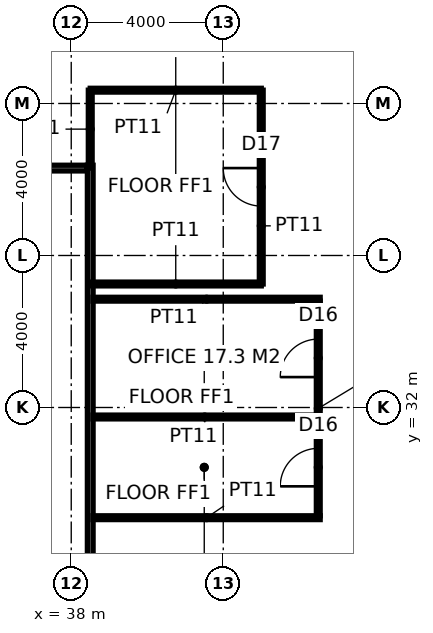
"""IFC4 building model, lengths in metres.
Left out: names, types, materials, properties, quantities, classifications, styles, units other than length and angle.
Written with IfcOpenShell. Run it as: python <this file> out.ifc"""

import sys

from ifc_helpers import new_model, si_unit, direction, frame, frame_2d, origin, place, context, subcontext, project, spatial, rectangle, extrude, element, fill, save


model = new_model("IFC4")
c1 = context("Model", 3, precision=1e-05, world=origin(), true_north=direction((0.0, 1.0)))
c2 = subcontext(c1, "Body", "Model", "MODEL_VIEW")
j1 = project(units=[si_unit("LENGTHUNIT", "METRE"), si_unit("PLANEANGLEUNIT", "RADIAN")], contexts=[c1])
p1 = place(None, origin())
s1 = spatial("IfcSite", under=j1, at=p1, CompositionType="ELEMENT")
p2 = place(p1, origin())
s2 = spatial("IfcBuilding", under=s1, at=p2, CompositionType="ELEMENT")
p3 = place(p2, frame((0.0, 0.0, 242.2)))
s3 = spatial("IfcBuildingStorey", under=s2, at=p3, CompositionType="ELEMENT", Elevation=242.2)
p4 = place(p3, frame((38.5, 15.625, 0.0), z_axis=(0.0, 0.0, 1.0), x_axis=(0.0, 1.0, 0.0)))
e1 = element("IfcWall", 1, at=p4, inside=s3, PredefinedType="PARTITIONING", context=c2, shape_type="SweptSolid", body=[
    extrude(rectangle(XDim=22.75, YDim=0.15, at=frame_2d((11.375, 0.0))), origin(), (0.0, 0.0, 1.0), 3.85),
])
p5 = place(p4, frame((10.475, 0.0, 0.0)))
e2 = element("IfcOpeningElement", 2, at=p5, cuts=e1, PredefinedType="OPENING", context=c2, shape_type="SweptSolid", body=[
    extrude(rectangle(XDim=1.8, YDim=2.4, at=frame_2d((0.9, 1.2))), frame((0.0, 0.085, 0.0), z_axis=(0.0, -1.0, 0.0), x_axis=(1.0, 0.0, 0.0)), (0.0, 0.0, 1.0), 0.17),
])
p6 = place(p3, frame((17.5, 38.3, 0.0), z_axis=(0.0, 0.0, 1.0), x_axis=(1.0, 0.0, 0.0)))
e3 = element("IfcWall", 3, at=p6, inside=s3, PredefinedType="PARTITIONING", context=c2, shape_type="SweptSolid", body=[
    extrude(rectangle(XDim=20.925, YDim=0.15, at=frame_2d((10.462, 0.0))), origin(), (0.0, 0.0, 1.0), 3.85),
])
p7 = place(p6, frame((6.25, 0.0, 0.0)))
e4 = element("IfcOpeningElement", 4, at=p7, cuts=e3, PredefinedType="OPENING", context=c2, shape_type="SweptSolid", body=[
    extrude(rectangle(XDim=0.9, YDim=2.1, at=frame_2d((0.45, 1.05))), frame((0.0, 0.085, 0.0), z_axis=(0.0, -1.0, 0.0), x_axis=(1.0, 0.0, 0.0)), (0.0, 0.0, 1.0), 0.17),
])
p8 = place(p6, frame((10.0, 0.0, 0.0)))
e5 = element("IfcOpeningElement", 5, at=p8, cuts=e3, PredefinedType="OPENING", context=c2, shape_type="SweptSolid", body=[
    extrude(rectangle(XDim=1.0, YDim=2.1, at=frame_2d((0.5, 1.05))), frame((0.0, 0.085, 0.0), z_axis=(0.0, -1.0, 0.0), x_axis=(1.0, 0.0, 0.0)), (0.0, 0.0, 1.0), 0.17),
])
p9 = place(p6, frame((13.85, 0.0, 0.0)))
e6 = element("IfcOpeningElement", 6, at=p9, cuts=e3, PredefinedType="OPENING", context=c2, shape_type="SweptSolid", body=[
    extrude(rectangle(XDim=0.9, YDim=2.1, at=frame_2d((0.45, 1.05))), frame((0.0, 0.085, 0.0), z_axis=(0.0, -1.0, 0.0), x_axis=(1.0, 0.0, 0.0)), (0.0, 0.0, 1.0), 0.17),
])
p10 = place(p3, frame((38.575, 29.1, 0.0), z_axis=(0.0, 0.0, 1.0), x_axis=(1.0, 0.0, 0.0)))
e7 = element("IfcWall", 7, at=p10, inside=s3, PredefinedType="PARTITIONING", context=c2, shape_type="SweptSolid", body=[
    extrude(rectangle(XDim=5.975, YDim=0.1, at=frame_2d((2.988, 0.0))), origin(), (0.0, 0.0, 1.0), 3.85),
])
p11 = place(p3, frame((38.575, 31.75, 0.0), z_axis=(0.0, 0.0, 1.0), x_axis=(1.0, 0.0, 0.0)))
e8 = element("IfcWall", 8, at=p11, inside=s3, PredefinedType="PARTITIONING", context=c2, shape_type="SweptSolid", body=[
    extrude(rectangle(XDim=5.875, YDim=0.1, at=frame_2d((2.938, 0.0))), origin(), (0.0, 0.0, 1.0), 3.85),
])
p12 = place(p3, frame((38.575, 34.85, 0.0), z_axis=(0.0, 0.0, 1.0), x_axis=(1.0, 0.0, 0.0)))
e9 = element("IfcWall", 9, at=p12, inside=s3, PredefinedType="PARTITIONING", context=c2, shape_type="SweptSolid", body=[
    extrude(rectangle(XDim=5.975, YDim=0.1, at=frame_2d((2.988, 0.0))), origin(), (0.0, 0.0, 1.0), 3.85),
])
p13 = place(p3, frame((44.5, 29.15, 0.0), z_axis=(0.0, 0.0, 1.0), x_axis=(0.0, 1.0, 0.0)))
e10 = element("IfcWall", 10, at=p13, inside=s3, PredefinedType="PARTITIONING", context=c2, shape_type="SweptSolid", body=[
    extrude(rectangle(XDim=5.65, YDim=0.1, at=frame_2d((2.825, 0.0))), origin(), (0.0, 0.0, 1.0), 3.85),
])
p14 = place(p13, frame((0.775, 0.0, 0.0)))
e11 = element("IfcOpeningElement", 11, at=p14, cuts=e10, PredefinedType="OPENING", context=c2, shape_type="SweptSolid", body=[
    extrude(rectangle(XDim=1.0, YDim=2.2, at=frame_2d((0.5, 1.1))), frame((0.0, 0.06, 0.0), z_axis=(0.0, -1.0, 0.0), x_axis=(1.0, 0.0, 0.0)), (0.0, 0.0, 1.0), 0.12),
])
p15 = place(p13, frame((3.65, 0.0, 0.0)))
e12 = element("IfcOpeningElement", 12, at=p15, cuts=e10, PredefinedType="OPENING", context=c2, shape_type="SweptSolid", body=[
    extrude(rectangle(XDim=1.0, YDim=2.2, at=frame_2d((0.5, 1.1))), frame((0.0, 0.06, 0.0), z_axis=(0.0, -1.0, 0.0), x_axis=(1.0, 0.0, 0.0)), (0.0, 0.0, 1.0), 0.12),
])
p16 = place(p3, frame((38.5, 35.25, 0.0), z_axis=(0.0, 0.0, 1.0), x_axis=(1.0, 0.0, 0.0)))
e13 = element("IfcWall", 13, at=p16, inside=s3, PredefinedType="PARTITIONING", context=c2, shape_type="SweptSolid", body=[
    extrude(rectangle(XDim=4.5, YDim=0.1, at=frame_2d((2.25, 0.0))), origin(), (0.0, 0.0, 1.0), 3.85),
])
p17 = place(p3, frame((43.0, 35.25, 0.0), z_axis=(0.0, 0.0, 1.0), x_axis=(0.0, 1.0, 0.0)))
e14 = element("IfcWall", 14, at=p17, inside=s3, PredefinedType="PARTITIONING", context=c2, shape_type="SweptSolid", body=[
    extrude(rectangle(XDim=5.1, YDim=0.1, at=frame_2d((2.55, 0.0))), origin(), (0.0, 0.0, 1.0), 3.85),
])
p18 = place(p17, frame((2.05, 0.0, 0.0)))
e15 = element("IfcOpeningElement", 15, at=p18, cuts=e14, PredefinedType="OPENING", context=c2, shape_type="SweptSolid", body=[
    extrude(rectangle(XDim=1.0, YDim=2.2, at=frame_2d((0.5, 1.1))), frame((0.0, 0.06, 0.0), z_axis=(0.0, -1.0, 0.0), x_axis=(1.0, 0.0, 0.0)), (0.0, 0.0, 1.0), 0.12),
])
p19 = place(p3, frame((43.0, 40.35, 0.0), z_axis=(0.0, 0.0, 1.0), x_axis=(-1.0, 0.0, 0.0)))
e16 = element("IfcWall", 16, at=p19, inside=s3, PredefinedType="PARTITIONING", context=c2, shape_type="SweptSolid", body=[
    extrude(rectangle(XDim=4.5, YDim=0.1, at=frame_2d((2.25, 0.0))), origin(), (0.0, 0.0, 1.0), 3.85),
])
p20 = place(p3, frame((38.5, 40.35, 0.0), z_axis=(0.0, 0.0, 1.0), x_axis=(0.0, -1.0, 0.0)))
e17 = element("IfcWall", 17, at=p20, inside=s3, PredefinedType="PARTITIONING", context=c2, shape_type="SweptSolid", body=[
    extrude(rectangle(XDim=2.05, YDim=0.1, at=frame_2d((1.025, 0.0))), origin(), (0.0, 0.0, 1.0), 3.85),
])
p21 = place(p14, origin())
e18 = element("IfcDoor", 18, at=p21, inside=s3, OperationType="SINGLE_SWING_LEFT", PredefinedType="DOOR", context=c2, shape_type="SweptSolid", body=[
    extrude(rectangle(XDim=1.0, YDim=2.2, at=frame_2d((0.5, 1.1))), frame((0.0, 0.025, 0.0), z_axis=(0.0, -1.0, 0.0), x_axis=(1.0, 0.0, 0.0)), (0.0, 0.0, 1.0), 0.05),
])
fill(e11, e18)
p22 = place(p15, origin())
e19 = element("IfcDoor", 19, at=p22, inside=s3, OperationType="SINGLE_SWING_LEFT", PredefinedType="DOOR", context=c2, shape_type="SweptSolid", body=[
    extrude(rectangle(XDim=1.0, YDim=2.2, at=frame_2d((0.5, 1.1))), frame((0.0, 0.025, 0.0), z_axis=(0.0, -1.0, 0.0), x_axis=(1.0, 0.0, 0.0)), (0.0, 0.0, 1.0), 0.05),
])
fill(e12, e19)
p23 = place(p18, origin())
e20 = element("IfcDoor", 20, at=p23, inside=s3, OperationType="SINGLE_SWING_RIGHT", PredefinedType="DOOR", context=c2, shape_type="SweptSolid", body=[
    extrude(rectangle(XDim=1.0, YDim=2.2, at=frame_2d((0.5, 1.1))), frame((0.0, 0.025, 0.0), z_axis=(0.0, -1.0, 0.0), x_axis=(1.0, 0.0, 0.0)), (0.0, 0.0, 1.0), 0.05),
])
fill(e15, e20)
save(model, sys.argv[1])
